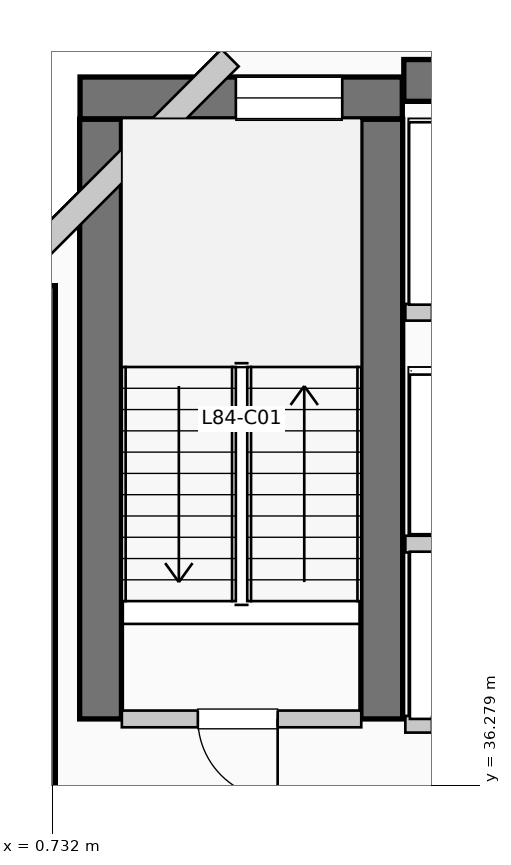
"""IFC4 building model, lengths in metres.
Left out: names, types, materials, properties, quantities, classifications, styles, units other than length and angle.
Written with IfcOpenShell. Run it as: python <this file> out.ifc"""

import sys

from ifc_helpers import new_model, si_unit, direction, frame, frame_2d, origin, place, context, subcontext, project, spatial, rectangle, extrude, element, fill, save


model = new_model("IFC4")
c1 = context("Model", 3, precision=1e-05, world=origin(), true_north=direction((0.0, 1.0)))
c2 = subcontext(c1, "Body", "Model", "MODEL_VIEW")
j1 = project(units=[si_unit("LENGTHUNIT", "METRE"), si_unit("PLANEANGLEUNIT", "RADIAN")], contexts=[c1])
p1 = place(None, origin())
s1 = spatial("IfcSite", under=j1, at=p1, CompositionType="ELEMENT")
p2 = place(p1, origin())
s2 = spatial("IfcBuilding", under=s1, at=p2, CompositionType="ELEMENT")
p3 = place(p2, frame((0.0, 0.0, 343.53)))
s3 = spatial("IfcBuildingStorey", under=s2, at=p3, CompositionType="ELEMENT", Elevation=343.53)
p4 = place(p3, frame((5.36, 45.55, 0.0), z_axis=(0.0, 0.0, 1.0), x_axis=(1.0, 0.0, 0.0)))
e1 = element("IfcWall", 1, at=p4, inside=s3, PredefinedType="SHEAR", context=c2, shape_type="SweptSolid", body=[
    extrude(rectangle(XDim=13.98, YDim=0.55, at=frame_2d((6.99, 0.0))), origin(), (0.0, 0.0, 1.0), 3.96),
])
p5 = place(p3, frame((0.5, 34.95, 0.0), z_axis=(0.0, 0.0, 1.0), x_axis=(0.0, 1.0, 0.0)))
e2 = element("IfcWall", 2, at=p5, inside=s3, PredefinedType="SHEAR", context=c2, shape_type="SweptSolid", body=[
    extrude(rectangle(XDim=7.9, YDim=0.55, at=frame_2d((3.95, 0.0))), origin(), (0.0, 0.0, 1.0), 3.96),
])
for number, where, z_axis, x_axis in (
    (3, (1.37, 37.15, 0.0), (0.0, 0.0, 1.0), (0.0, 1.0, 0.0)),
    (4, (5.07, 37.15, 0.0), (0.0, 0.0, 1.0), (0.0, 1.0, 0.0)),
):
    element("IfcWall", number, at=place(p3, frame(where, z_axis=z_axis, x_axis=x_axis)), inside=s3, PredefinedType="SHEAR", context=c2, shape_type="SweptSolid", body=[
        extrude(rectangle(XDim=7.89, YDim=0.55, at=frame_2d((3.945, 0.0))), origin(), (0.0, 0.0, 1.0), 3.96),
    ])
p6 = place(p3, frame((1.1, 45.32, 0.0), z_axis=(0.0, 0.0, 1.0), x_axis=(1.0, 0.0, 0.0)))
e5 = element("IfcWall", 5, at=p6, inside=s3, PredefinedType="SHEAR", context=c2, shape_type="SweptSolid", body=[
    extrude(rectangle(XDim=4.24, YDim=0.55, at=frame_2d((2.12, 0.0))), origin(), (0.0, 0.0, 1.0), 3.96),
])
p7 = place(p6, frame((2.05, 0.0, 1.05)))
e6 = element("IfcOpeningElement", 6, at=p7, cuts=e5, PredefinedType="OPENING", context=c2, shape_type="SweptSolid", body=[
    extrude(rectangle(XDim=1.4, YDim=1.8, at=frame_2d((0.7, 0.9))), frame((0.0, 0.285, 0.0), z_axis=(0.0, -1.0, 0.0), x_axis=(1.0, 0.0, 0.0)), (0.0, 0.0, 1.0), 0.57),
])
p8 = place(p3, frame((3.074, 45.848, 0.0), z_axis=(0.0, 0.0, 1.0), x_axis=(-0.707106781187, -0.707106781187, 0.0)))
e7 = element("IfcWall", 7, at=p8, inside=s3, PredefinedType="SOLIDWALL", context=c2, shape_type="SweptSolid", body=[
    extrude(rectangle(XDim=4.133, YDim=0.32, at=frame_2d((2.066, 0.0))), origin(), (0.0, 0.0, 1.0), 3.71),
])
p9 = place(p3, frame((1.65, 37.15, 0.0), z_axis=(0.0, 0.0, 1.0), x_axis=(1.0, 0.0, 0.0)))
e8 = element("IfcWall", 8, at=p9, inside=s3, PredefinedType="PARTITIONING", context=c2, shape_type="SweptSolid", body=[
    extrude(rectangle(XDim=3.15, YDim=0.22, at=frame_2d((1.575, 0.0))), origin(), (0.0, 0.0, 1.0), 3.71),
])
p10 = place(p9, frame((2.05, 0.0, 0.0), z_axis=(0.0, 0.0, 1.0), x_axis=(-1.0, 0.0, 0.0)))
e9 = element("IfcOpeningElement", 9, at=p10, cuts=e8, PredefinedType="OPENING", context=c2, shape_type="SweptSolid", body=[
    extrude(rectangle(XDim=1.05, YDim=2.15, at=frame_2d((0.525, 1.075))), frame((0.0, 0.12, 0.0), z_axis=(0.0, -1.0, 0.0), x_axis=(1.0, 0.0, 0.0)), (0.0, 0.0, 1.0), 0.24),
])
p11 = place(p3, frame((5.38, 37.08, 0.0), z_axis=(0.0, 0.0, 1.0), x_axis=(1.0, 0.0, 0.0)))
e10 = element("IfcWall", 10, at=p11, inside=s3, PredefinedType="PARTITIONING", context=c2, shape_type="SweptSolid", body=[
    extrude(rectangle(XDim=3.46, YDim=0.22, at=frame_2d((1.73, 0.0))), origin(), (0.0, 0.0, 1.0), 3.71),
])
p12 = place(p11, frame((1.55, 0.0, 0.0), z_axis=(0.0, 0.0, 1.0), x_axis=(-1.0, 0.0, 0.0)))
e11 = element("IfcOpeningElement", 11, at=p12, cuts=e10, PredefinedType="OPENING", context=c2, shape_type="SweptSolid", body=[
    extrude(rectangle(XDim=1.2, YDim=2.2, at=frame_2d((0.6, 1.1))), frame((0.0, 0.12, 0.0), z_axis=(0.0, -1.0, 0.0), x_axis=(1.0, 0.0, 0.0)), (0.0, 0.0, 1.0), 0.24),
])
p13 = place(p11, frame((3.22, 0.0, 0.0), z_axis=(0.0, 0.0, 1.0), x_axis=(-1.0, 0.0, 0.0)))
e12 = element("IfcOpeningElement", 12, at=p13, cuts=e10, PredefinedType="OPENING", context=c2, shape_type="SweptSolid", body=[
    extrude(rectangle(XDim=1.2, YDim=2.2, at=frame_2d((0.6, 1.1))), frame((0.0, 0.12, 0.0), z_axis=(0.0, -1.0, 0.0), x_axis=(1.0, 0.0, 0.0)), (0.0, 0.0, 1.0), 0.24),
])
p14 = place(p3, frame((5.38, 39.45, 0.0), z_axis=(0.0, 0.0, 1.0), x_axis=(1.0, 0.0, 0.0)))
e13 = element("IfcWall", 13, at=p14, inside=s3, PredefinedType="PARTITIONING", context=c2, shape_type="SweptSolid", body=[
    extrude(rectangle(XDim=3.46, YDim=0.22, at=frame_2d((1.73, 0.0))), origin(), (0.0, 0.0, 1.0), 3.71),
])
p15 = place(p3, frame((5.38, 42.5, 0.0), z_axis=(0.0, 0.0, 1.0), x_axis=(1.0, 0.0, 0.0)))
e14 = element("IfcWall", 14, at=p15, inside=s3, PredefinedType="PARTITIONING", context=c2, shape_type="SweptSolid", body=[
    extrude(rectangle(XDim=3.77, YDim=0.22, at=frame_2d((1.885, 0.0))), origin(), (0.0, 0.0, 1.0), 3.71),
])
p16 = place(p15, frame((1.75, 0.0, 0.0), z_axis=(0.0, 0.0, 1.0), x_axis=(-1.0, 0.0, 0.0)))
e15 = element("IfcOpeningElement", 15, at=p16, cuts=e14, PredefinedType="OPENING", context=c2, shape_type="SweptSolid", body=[
    extrude(rectangle(XDim=1.4, YDim=2.2, at=frame_2d((0.7, 1.1))), frame((0.0, 0.12, 0.0), z_axis=(0.0, -1.0, 0.0), x_axis=(1.0, 0.0, 0.0)), (0.0, 0.0, 1.0), 0.24),
])
p17 = place(p15, frame((3.53, 0.0, 0.0), z_axis=(0.0, 0.0, 1.0), x_axis=(-1.0, 0.0, 0.0)))
e16 = element("IfcOpeningElement", 16, at=p17, cuts=e14, PredefinedType="OPENING", context=c2, shape_type="SweptSolid", body=[
    extrude(rectangle(XDim=1.4, YDim=2.2, at=frame_2d((0.7, 1.1))), frame((0.0, 0.12, 0.0), z_axis=(0.0, -1.0, 0.0), x_axis=(1.0, 0.0, 0.0)), (0.0, 0.0, 1.0), 0.24),
])
p18 = place(p7, origin())
e17 = element("IfcWindow", 17, at=p18, inside=s3, PartitioningType="SINGLE_PANEL", PredefinedType="WINDOW", context=c2, shape_type="SweptSolid", body=[
    extrude(rectangle(XDim=1.4, YDim=1.8, at=frame_2d((0.7, 0.9))), frame((0.0, 0.03, 0.0), z_axis=(0.0, -1.0, 0.0), x_axis=(1.0, 0.0, 0.0)), (0.0, 0.0, 1.0), 0.06),
])
fill(e6, e17)
p19 = place(p10, origin())
e18 = element("IfcDoor", 18, at=p19, inside=s3, OperationType="SINGLE_SWING_RIGHT", PredefinedType="DOOR", context=c2, shape_type="SweptSolid", body=[
    extrude(rectangle(XDim=1.05, YDim=2.15, at=frame_2d((0.525, 1.075))), frame((0.0, 0.025, 0.0), z_axis=(0.0, -1.0, 0.0), x_axis=(1.0, 0.0, 0.0)), (0.0, 0.0, 1.0), 0.05),
])
fill(e9, e18)
save(model, sys.argv[1])
